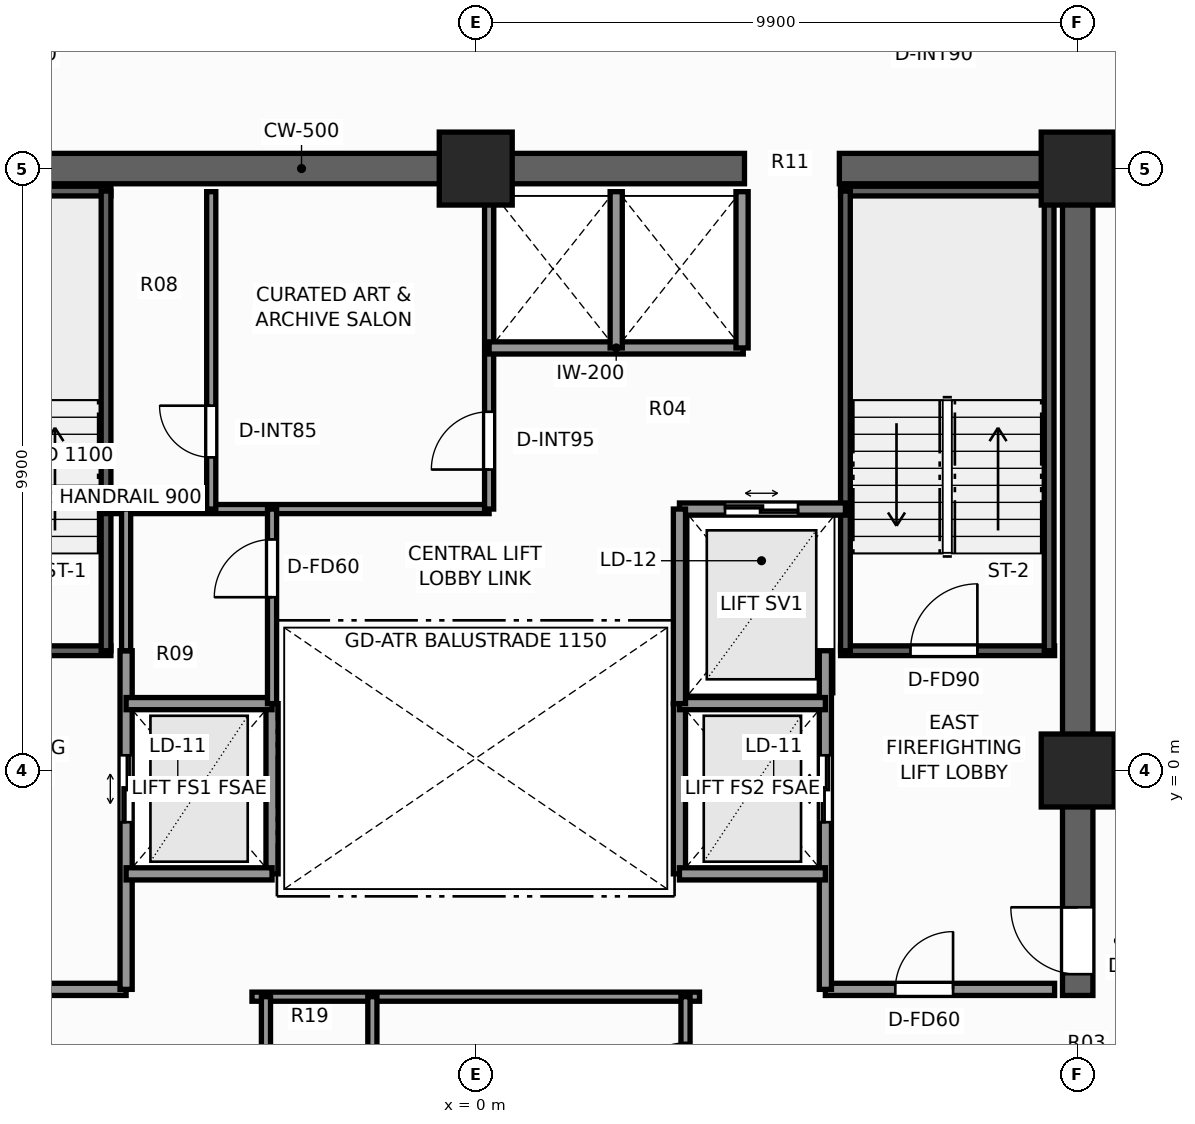
"""IFC4 building model, lengths in metres.
Left out: names, types, materials, properties, quantities, classifications, styles, units other than length and angle.
Written with IfcOpenShell. Run it as: python <this file> out.ifc"""

import sys

from ifc_helpers import new_model, si_unit, direction, frame, frame_2d, origin, origin_2d, place, context, subcontext, project, spatial, rectangle, extrude, element, fill, save


model = new_model("IFC4")
c1 = context("Model", 3, precision=1e-05, world=origin(), true_north=direction((0.0, 1.0)))
c2 = subcontext(c1, "Body", "Model", "MODEL_VIEW")
j1 = project(units=[si_unit("LENGTHUNIT", "METRE"), si_unit("PLANEANGLEUNIT", "RADIAN")], contexts=[c1])
p1 = place(None, origin())
s1 = spatial("IfcSite", under=j1, at=p1, CompositionType="ELEMENT")
p2 = place(p1, origin())
s2 = spatial("IfcBuilding", under=s1, at=p2, CompositionType="ELEMENT")
p3 = place(p2, frame((0.0, 0.0, 173.4)))
s3 = spatial("IfcBuildingStorey", under=s2, at=p3, CompositionType="ELEMENT", Elevation=173.4)
p4 = place(p3, frame((-10.15, 9.9, 0.0), z_axis=(0.0, 0.0, 1.0), x_axis=(1.0, 0.0, 0.0)))
e1 = element("IfcWall", 1, at=p4, inside=s3, PredefinedType="SHEAR", context=c2, shape_type="SweptSolid", body=[
    extrude(rectangle(XDim=14.57, YDim=0.5, at=frame_2d((7.285, 0.0))), origin(), (0.0, 0.0, 1.0), 3.3),
])
p5 = place(p3, frame((5.98, 9.9, 0.0), z_axis=(0.0, 0.0, 1.0), x_axis=(1.0, 0.0, 0.0)))
e2 = element("IfcWall", 2, at=p5, inside=s3, PredefinedType="SHEAR", context=c2, shape_type="SweptSolid", body=[
    extrude(rectangle(XDim=4.17, YDim=0.5, at=frame_2d((2.085, 0.0))), origin(), (0.0, 0.0, 1.0), 3.3),
])
p6 = place(p3, frame((9.9, -3.7, 0.0), z_axis=(0.0, 0.0, 1.0), x_axis=(0.0, 1.0, 0.0)))
e3 = element("IfcWall", 3, at=p6, inside=s3, PredefinedType="SHEAR", context=c2, shape_type="SweptSolid", body=[
    extrude(rectangle(XDim=13.35, YDim=0.5, at=frame_2d((6.675, 0.0))), origin(), (0.0, 0.0, 1.0), 3.3),
])
p7 = place(p6, frame((0.35, 0.0, 0.0)))
e4 = element("IfcOpeningElement", 4, at=p7, cuts=e3, PredefinedType="OPENING", context=c2, shape_type="SweptSolid", body=[
    extrude(rectangle(XDim=1.1, YDim=2.2, at=frame_2d((0.55, 1.1))), frame((0.0, 0.26, 0.0), z_axis=(0.0, -1.0, 0.0), x_axis=(1.0, 0.0, 0.0)), (0.0, 0.0, 1.0), 0.52),
])
for number, where, z_axis, x_axis in (
    (5, (9.9, 9.9, 0.0), (0.0, 0.0, 1.0), (1.0, 0.0, 0.0)),
    (6, (9.9, 0.0, 0.0), (0.0, 0.0, 1.0), (1.0, 0.0, 0.0)),
    (7, (0.0, 9.9, 0.0), (0.0, 0.0, 1.0), (1.0, 0.0, 0.0)),
):
    element("IfcColumn", number, at=place(p3, frame(where, z_axis=z_axis, x_axis=x_axis)), inside=s3, PredefinedType="COLUMN", context=c2, shape_type="SweptSolid", body=[
        extrude(rectangle(XDim=1.2, YDim=1.2, at=origin_2d()), origin(), (0.0, 0.0, 1.0), 3.3),
    ])
p8 = place(p3, frame((-9.52, 1.97, 0.0), z_axis=(0.0, 0.0, 1.0), x_axis=(1.0, 0.0, 0.0)))
e8 = element("IfcWall", 8, at=p8, inside=s3, PredefinedType="SHEAR", context=c2, shape_type="SweptSolid", body=[
    extrude(rectangle(XDim=3.52, YDim=0.16, at=frame_2d((1.76, 0.0))), origin(), (0.0, 0.0, 1.0), 3.3),
])
p9 = place(p8, frame((1.15, 0.0, 0.0)))
e9 = element("IfcOpeningElement", 9, at=p9, cuts=e8, PredefinedType="OPENING", context=c2, shape_type="SweptSolid", body=[
    extrude(rectangle(XDim=1.1, YDim=2.2, at=frame_2d((0.55, 1.1))), frame((0.0, 0.09, 0.0), z_axis=(0.0, -1.0, 0.0), x_axis=(1.0, 0.0, 0.0)), (0.0, 0.0, 1.0), 0.18),
])
p10 = place(p3, frame((-9.52, 9.53, 0.0), z_axis=(0.0, 0.0, 1.0), x_axis=(1.0, 0.0, 0.0)))
e10 = element("IfcWall", 10, at=p10, inside=s3, PredefinedType="SHEAR", context=c2, shape_type="SweptSolid", body=[
    extrude(rectangle(XDim=3.52, YDim=0.16, at=frame_2d((1.76, 0.0))), origin(), (0.0, 0.0, 1.0), 3.3),
])
p11 = place(p3, frame((-6.08, 1.97, 0.0), z_axis=(0.0, 0.0, 1.0), x_axis=(0.0, 1.0, 0.0)))
e11 = element("IfcWall", 11, at=p11, inside=s3, PredefinedType="SHEAR", context=c2, shape_type="SweptSolid", body=[
    extrude(rectangle(XDim=7.56, YDim=0.16, at=frame_2d((3.78, 0.0))), origin(), (0.0, 0.0, 1.0), 3.3),
])
p12 = place(p3, frame((6.0, 1.97, 0.0), z_axis=(0.0, 0.0, 1.0), x_axis=(1.0, 0.0, 0.0)))
e12 = element("IfcWall", 12, at=p12, inside=s3, PredefinedType="SHEAR", context=c2, shape_type="SweptSolid", body=[
    extrude(rectangle(XDim=3.52, YDim=0.16, at=frame_2d((1.76, 0.0))), origin(), (0.0, 0.0, 1.0), 3.3),
])
p13 = place(p12, frame((1.15, 0.0, 0.0)))
e13 = element("IfcOpeningElement", 13, at=p13, cuts=e12, PredefinedType="OPENING", context=c2, shape_type="SweptSolid", body=[
    extrude(rectangle(XDim=1.1, YDim=2.2, at=frame_2d((0.55, 1.1))), frame((0.0, 0.09, 0.0), z_axis=(0.0, -1.0, 0.0), x_axis=(1.0, 0.0, 0.0)), (0.0, 0.0, 1.0), 0.18),
])
p14 = place(p3, frame((6.0, 9.53, 0.0), z_axis=(0.0, 0.0, 1.0), x_axis=(1.0, 0.0, 0.0)))
e14 = element("IfcWall", 14, at=p14, inside=s3, PredefinedType="SHEAR", context=c2, shape_type="SweptSolid", body=[
    extrude(rectangle(XDim=3.52, YDim=0.16, at=frame_2d((1.76, 0.0))), origin(), (0.0, 0.0, 1.0), 3.3),
])
for number, where, z_axis, x_axis in (
    (15, (6.08, 1.97, 0.0), (0.0, 0.0, 1.0), (0.0, 1.0, 0.0)),
    (16, (9.43, 1.97, 0.0), (0.0, 0.0, 1.0), (0.0, 1.0, 0.0)),
):
    element("IfcWall", number, at=place(p3, frame(where, z_axis=z_axis, x_axis=x_axis)), inside=s3, PredefinedType="SHEAR", context=c2, shape_type="SweptSolid", body=[
        extrude(rectangle(XDim=7.56, YDim=0.16, at=frame_2d((3.78, 0.0))), origin(), (0.0, 0.0, 1.0), 3.3),
    ])
p15 = place(p3, frame((-9.52, -3.6, 0.0), z_axis=(0.0, 0.0, 1.0), x_axis=(1.0, 0.0, 0.0)))
e17 = element("IfcWall", 17, at=p15, inside=s3, PredefinedType="SOLIDWALL", context=c2, shape_type="SweptSolid", body=[
    extrude(rectangle(XDim=3.77, YDim=0.2, at=frame_2d((1.885, 0.0))), origin(), (0.0, 0.0, 1.0), 3.08),
])
p16 = place(p15, frame((1.15, 0.0, 0.0)))
e18 = element("IfcOpeningElement", 18, at=p16, cuts=e17, PredefinedType="OPENING", context=c2, shape_type="SweptSolid", body=[
    extrude(rectangle(XDim=0.95, YDim=2.06, at=frame_2d((0.475, 1.03))), frame((0.0, 0.11, 0.0), z_axis=(0.0, -1.0, 0.0), x_axis=(1.0, 0.0, 0.0)), (0.0, 0.0, 1.0), 0.22),
])
p17 = place(p3, frame((-5.75, -3.6, 0.0), z_axis=(0.0, 0.0, 1.0), x_axis=(0.0, 1.0, 0.0)))
e19 = element("IfcWall", 19, at=p17, inside=s3, PredefinedType="SOLIDWALL", context=c2, shape_type="SweptSolid", body=[
    extrude(rectangle(XDim=5.57, YDim=0.2, at=frame_2d((2.785, 0.0))), origin(), (0.0, 0.0, 1.0), 2.715),
])
p18 = place(p17, frame((2.75, 0.0, 0.0)))
e20 = element("IfcOpeningElement", 20, at=p18, cuts=e19, PredefinedType="OPENING", context=c2, shape_type="SweptSolid", body=[
    extrude(rectangle(XDim=1.1, YDim=2.2, at=frame_2d((0.55, 1.1))), frame((0.0, 0.11, 0.0), z_axis=(0.0, -1.0, 0.0), x_axis=(1.0, 0.0, 0.0)), (0.0, 0.0, 1.0), 0.22),
])
p19 = place(p3, frame((-3.35, -1.7, 0.0), z_axis=(0.0, 0.0, 1.0), x_axis=(0.0, 1.0, 0.0)))
e21 = element("IfcWall", 21, at=p19, inside=s3, PredefinedType="SOLIDWALL", context=c2, shape_type="SweptSolid", body=[
    extrude(rectangle(XDim=2.8, YDim=0.2, at=frame_2d((1.4, 0.0))), origin(), (0.0, 0.0, 1.0), 2.715),
])
for number, where, z_axis, x_axis in (
    (22, (-5.75, -1.7, 0.0), (0.0, 0.0, 1.0), (1.0, 0.0, 0.0)),
    (23, (-5.75, 1.1, 0.0), (0.0, 0.0, 1.0), (1.0, 0.0, 0.0)),
):
    element("IfcWall", number, at=place(p3, frame(where, z_axis=z_axis, x_axis=x_axis)), inside=s3, PredefinedType="SOLIDWALL", context=c2, shape_type="SweptSolid", body=[
        extrude(rectangle(XDim=2.4, YDim=0.2, at=frame_2d((1.2, 0.0))), origin(), (0.0, 0.0, 1.0), 3.08),
    ])
p20 = place(p3, frame((5.75, -3.6, 0.0), z_axis=(0.0, 0.0, 1.0), x_axis=(1.0, 0.0, 0.0)))
e24 = element("IfcWall", 24, at=p20, inside=s3, PredefinedType="SOLIDWALL", context=c2, shape_type="SweptSolid", body=[
    extrude(rectangle(XDim=3.77, YDim=0.2, at=frame_2d((1.885, 0.0))), origin(), (0.0, 0.0, 1.0), 3.08),
])
p21 = place(p20, frame((1.15, 0.0, 0.0)))
e25 = element("IfcOpeningElement", 25, at=p21, cuts=e24, PredefinedType="OPENING", context=c2, shape_type="SweptSolid", body=[
    extrude(rectangle(XDim=0.95, YDim=2.06, at=frame_2d((0.475, 1.03))), frame((0.0, 0.11, 0.0), z_axis=(0.0, -1.0, 0.0), x_axis=(1.0, 0.0, 0.0)), (0.0, 0.0, 1.0), 0.22),
])
p22 = place(p3, frame((5.75, -3.6, 0.0), z_axis=(0.0, 0.0, 1.0), x_axis=(0.0, 1.0, 0.0)))
e26 = element("IfcWall", 26, at=p22, inside=s3, PredefinedType="SOLIDWALL", context=c2, shape_type="SweptSolid", body=[
    extrude(rectangle(XDim=5.57, YDim=0.2, at=frame_2d((2.785, 0.0))), origin(), (0.0, 0.0, 1.0), 2.715),
])
p23 = place(p22, frame((2.75, 0.0, 0.0)))
e27 = element("IfcOpeningElement", 27, at=p23, cuts=e26, PredefinedType="OPENING", context=c2, shape_type="SweptSolid", body=[
    extrude(rectangle(XDim=1.1, YDim=2.2, at=frame_2d((0.55, 1.1))), frame((0.0, 0.11, 0.0), z_axis=(0.0, -1.0, 0.0), x_axis=(1.0, 0.0, 0.0)), (0.0, 0.0, 1.0), 0.22),
])
p24 = place(p3, frame((3.35, -1.7, 0.0), z_axis=(0.0, 0.0, 1.0), x_axis=(0.0, 1.0, 0.0)))
e28 = element("IfcWall", 28, at=p24, inside=s3, PredefinedType="SOLIDWALL", context=c2, shape_type="SweptSolid", body=[
    extrude(rectangle(XDim=2.8, YDim=0.2, at=frame_2d((1.4, 0.0))), origin(), (0.0, 0.0, 1.0), 2.715),
])
for number, where, z_axis, x_axis in (
    (29, (3.35, -1.7, 0.0), (0.0, 0.0, 1.0), (1.0, 0.0, 0.0)),
    (30, (3.35, 1.1, 0.0), (0.0, 0.0, 1.0), (1.0, 0.0, 0.0)),
):
    element("IfcWall", number, at=place(p3, frame(where, z_axis=z_axis, x_axis=x_axis)), inside=s3, PredefinedType="SOLIDWALL", context=c2, shape_type="SweptSolid", body=[
        extrude(rectangle(XDim=2.4, YDim=0.2, at=frame_2d((1.2, 0.0))), origin(), (0.0, 0.0, 1.0), 3.08),
    ])
p25 = place(p3, frame((3.35, 4.3, 0.0), z_axis=(0.0, 0.0, 1.0), x_axis=(1.0, 0.0, 0.0)))
e31 = element("IfcWall", 31, at=p25, inside=s3, PredefinedType="SOLIDWALL", context=c2, shape_type="SweptSolid", body=[
    extrude(rectangle(XDim=2.73, YDim=0.2, at=frame_2d((1.365, 0.0))), origin(), (0.0, 0.0, 1.0), 3.08),
])
p26 = place(p25, frame((0.75, 0.0, 0.0)))
e32 = element("IfcOpeningElement", 32, at=p26, cuts=e31, PredefinedType="OPENING", context=c2, shape_type="SweptSolid", body=[
    extrude(rectangle(XDim=1.2, YDim=2.25, at=frame_2d((0.6, 1.125))), frame((0.0, 0.11, 0.0), z_axis=(0.0, -1.0, 0.0), x_axis=(1.0, 0.0, 0.0)), (0.0, 0.0, 1.0), 0.22),
])
p27 = place(p3, frame((3.35, 1.1, 0.0), z_axis=(0.0, 0.0, 1.0), x_axis=(0.0, 1.0, 0.0)))
e33 = element("IfcWall", 33, at=p27, inside=s3, PredefinedType="SOLIDWALL", context=c2, shape_type="SweptSolid", body=[
    extrude(rectangle(XDim=3.2, YDim=0.2, at=frame_2d((1.6, 0.0))), origin(), (0.0, 0.0, 1.0), 2.715),
])
p28 = place(p3, frame((-6.08, 4.3, 0.0), z_axis=(0.0, 0.0, 1.0), x_axis=(1.0, 0.0, 0.0)))
e34 = element("IfcWall", 34, at=p28, inside=s3, PredefinedType="PARTITIONING", context=c2, shape_type="SweptSolid", body=[
    extrude(rectangle(XDim=6.3, YDim=0.15, at=frame_2d((3.15, 0.0))), origin(), (0.0, 0.0, 1.0), 3.08),
])
p29 = place(p3, frame((0.22, 4.3, 0.0), z_axis=(0.0, 0.0, 1.0), x_axis=(0.0, 1.0, 0.0)))
e35 = element("IfcWall", 35, at=p29, inside=s3, PredefinedType="PARTITIONING", context=c2, shape_type="SweptSolid", body=[
    extrude(rectangle(XDim=5.22, YDim=0.15, at=frame_2d((2.61, 0.0))), origin(), (0.0, 0.0, 1.0), 3.08),
])
p30 = place(p29, frame((0.65, 0.0, 0.0)))
e36 = element("IfcOpeningElement", 36, at=p30, cuts=e35, PredefinedType="OPENING", context=c2, shape_type="SweptSolid", body=[
    extrude(rectangle(XDim=0.95, YDim=2.06, at=frame_2d((0.475, 1.03))), frame((0.0, 0.085, 0.0), z_axis=(0.0, -1.0, 0.0), x_axis=(1.0, 0.0, 0.0)), (0.0, 0.0, 1.0), 0.17),
])
p31 = place(p3, frame((-4.35, 4.3, 0.0), z_axis=(0.0, 0.0, 1.0), x_axis=(0.0, 1.0, 0.0)))
e37 = element("IfcWall", 37, at=p31, inside=s3, PredefinedType="PARTITIONING", context=c2, shape_type="SweptSolid", body=[
    extrude(rectangle(XDim=5.22, YDim=0.15, at=frame_2d((2.61, 0.0))), origin(), (0.0, 0.0, 1.0), 3.08),
])
p32 = place(p31, frame((0.85, 0.0, 0.0)))
e38 = element("IfcOpeningElement", 38, at=p32, cuts=e37, PredefinedType="OPENING", context=c2, shape_type="SweptSolid", body=[
    extrude(rectangle(XDim=0.85, YDim=2.03, at=frame_2d((0.425, 1.015))), frame((0.0, 0.085, 0.0), z_axis=(0.0, -1.0, 0.0), x_axis=(1.0, 0.0, 0.0)), (0.0, 0.0, 1.0), 0.17),
])
p33 = place(p3, frame((0.22, 6.95, 0.0), z_axis=(0.0, 0.0, 1.0), x_axis=(1.0, 0.0, 0.0)))
e39 = element("IfcWall", 39, at=p33, inside=s3, PredefinedType="SOLIDWALL", context=c2, shape_type="SweptSolid", body=[
    extrude(rectangle(XDim=4.18, YDim=0.2, at=frame_2d((2.09, 0.0))), origin(), (0.0, 0.0, 1.0), 3.08),
])
for number, where, z_axis, x_axis in (
    (40, (4.38, 6.95, 0.0), (0.0, 0.0, 1.0), (0.0, 1.0, 0.0)),
    (41, (2.31, 6.95, 0.0), (0.0, 0.0, 1.0), (0.0, 1.0, 0.0)),
):
    element("IfcWall", number, at=place(p3, frame(where, z_axis=z_axis, x_axis=x_axis)), inside=s3, PredefinedType="SOLIDWALL", context=c2, shape_type="SweptSolid", body=[
        extrude(rectangle(XDim=2.57, YDim=0.2, at=frame_2d((1.285, 0.0))), origin(), (0.0, 0.0, 1.0), 3.08),
    ])
p34 = place(p3, frame((-3.68, -3.72, 0.0), z_axis=(0.0, 0.0, 1.0), x_axis=(1.0, 0.0, 0.0)))
e42 = element("IfcWall", 42, at=p34, inside=s3, PredefinedType="PARTITIONING", context=c2, shape_type="SweptSolid", body=[
    extrude(rectangle(XDim=7.36, YDim=0.15, at=frame_2d((3.68, 0.0))), origin(), (0.0, 0.0, 1.0), 3.08),
])
p35 = place(p3, frame((3.45, -6.08, 0.0), z_axis=(0.0, 0.0, 1.0), x_axis=(0.0, 1.0, 0.0)))
e43 = element("IfcWall", 43, at=p35, inside=s3, PredefinedType="PARTITIONING", context=c2, shape_type="SweptSolid", body=[
    extrude(rectangle(XDim=2.36, YDim=0.15, at=frame_2d((1.18, 0.0))), origin(), (0.0, 0.0, 1.0), 3.08),
])
p36 = place(p35, frame((0.65, 0.0, 0.0)))
e44 = element("IfcOpeningElement", 44, at=p36, cuts=e43, PredefinedType="OPENING", context=c2, shape_type="SweptSolid", body=[
    extrude(rectangle(XDim=0.95, YDim=2.06, at=frame_2d((0.475, 1.03))), frame((0.0, 0.085, 0.0), z_axis=(0.0, -1.0, 0.0), x_axis=(1.0, 0.0, 0.0)), (0.0, 0.0, 1.0), 0.17),
])
p37 = place(p3, frame((-3.45, -6.08, 0.0), z_axis=(0.0, 0.0, 1.0), x_axis=(0.0, 1.0, 0.0)))
e45 = element("IfcWall", 45, at=p37, inside=s3, PredefinedType="PARTITIONING", context=c2, shape_type="SweptSolid", body=[
    extrude(rectangle(XDim=2.36, YDim=0.15, at=frame_2d((1.18, 0.0))), origin(), (0.0, 0.0, 1.0), 3.08),
])
p38 = place(p3, frame((-1.7, -6.08, 0.0), z_axis=(0.0, 0.0, 1.0), x_axis=(0.0, 1.0, 0.0)))
e46 = element("IfcWall", 46, at=p38, inside=s3, PredefinedType="PARTITIONING", context=c2, shape_type="SweptSolid", body=[
    extrude(rectangle(XDim=2.36, YDim=0.15, at=frame_2d((1.18, 0.0))), origin(), (0.0, 0.0, 1.0), 3.08),
])
p39 = place(p38, frame((0.65, 0.0, 0.0)))
e47 = element("IfcOpeningElement", 47, at=p39, cuts=e46, PredefinedType="OPENING", context=c2, shape_type="SweptSolid", body=[
    extrude(rectangle(XDim=0.9, YDim=2.06, at=frame_2d((0.45, 1.03))), frame((0.0, 0.085, 0.0), z_axis=(0.0, -1.0, 0.0), x_axis=(1.0, 0.0, 0.0)), (0.0, 0.0, 1.0), 0.17),
])
p40 = place(p3, frame((-3.35, 1.1, 0.0), z_axis=(0.0, 0.0, 1.0), x_axis=(0.0, 1.0, 0.0)))
e48 = element("IfcWall", 48, at=p40, inside=s3, PredefinedType="PARTITIONING", context=c2, shape_type="SweptSolid", body=[
    extrude(rectangle(XDim=3.2, YDim=0.15, at=frame_2d((1.6, 0.0))), origin(), (0.0, 0.0, 1.0), 2.715),
])
p41 = place(p40, frame((1.75, 0.0, 0.0)))
e49 = element("IfcOpeningElement", 49, at=p41, cuts=e48, PredefinedType="OPENING", context=c2, shape_type="SweptSolid", body=[
    extrude(rectangle(XDim=0.95, YDim=2.06, at=frame_2d((0.475, 1.03))), frame((0.0, 0.085, 0.0), z_axis=(0.0, -1.0, 0.0), x_axis=(1.0, 0.0, 0.0)), (0.0, 0.0, 1.0), 0.17),
])
p42 = place(p3, frame((-5.75, 1.97, 0.0), z_axis=(0.0, 0.0, 1.0), x_axis=(0.0, 1.0, 0.0)))
e50 = element("IfcWall", 50, at=p42, inside=s3, PredefinedType="PARTITIONING", context=c2, shape_type="SweptSolid", body=[
    extrude(rectangle(XDim=2.33, YDim=0.15, at=frame_2d((1.165, 0.0))), origin(), (0.0, 0.0, 1.0), 2.715),
])
p43 = place(p13, origin())
e51 = element("IfcDoor", 51, at=p43, inside=s3, OperationType="SINGLE_SWING_RIGHT", PredefinedType="DOOR", context=c2, shape_type="SweptSolid", body=[
    extrude(rectangle(XDim=1.1, YDim=2.2, at=frame_2d((0.55, 1.1))), frame((0.0, 0.025, 0.0), z_axis=(0.0, -1.0, 0.0), x_axis=(1.0, 0.0, 0.0)), (0.0, 0.0, 1.0), 0.05),
])
fill(e13, e51)
p44 = place(p18, origin())
e52 = element("IfcDoor", 52, at=p44, inside=s3, OperationType="DOUBLE_DOOR_SLIDING", PredefinedType="DOOR", context=c2, shape_type="SweptSolid", body=[
    extrude(rectangle(XDim=1.1, YDim=2.2, at=frame_2d((0.55, 1.1))), frame((0.0, 0.025, 0.0), z_axis=(0.0, -1.0, 0.0), x_axis=(1.0, 0.0, 0.0)), (0.0, 0.0, 1.0), 0.05),
])
fill(e20, e52)
p45 = place(p7, origin())
e53 = element("IfcDoor", 53, at=p45, inside=s3, OperationType="SINGLE_SWING_RIGHT", PredefinedType="DOOR", context=c2, shape_type="SweptSolid", body=[
    extrude(rectangle(XDim=1.1, YDim=2.2, at=frame_2d((0.55, 1.1))), frame((0.0, 0.025, 0.0), z_axis=(0.0, -1.0, 0.0), x_axis=(1.0, 0.0, 0.0)), (0.0, 0.0, 1.0), 0.05),
])
fill(e4, e53)
p46 = place(p23, origin())
e54 = element("IfcDoor", 54, at=p46, inside=s3, OperationType="DOUBLE_DOOR_SLIDING", PredefinedType="DOOR", context=c2, shape_type="SweptSolid", body=[
    extrude(rectangle(XDim=1.1, YDim=2.2, at=frame_2d((0.55, 1.1))), frame((0.0, 0.025, 0.0), z_axis=(0.0, -1.0, 0.0), x_axis=(1.0, 0.0, 0.0)), (0.0, 0.0, 1.0), 0.05),
])
fill(e27, e54)
p47 = place(p26, origin())
e55 = element("IfcDoor", 55, at=p47, inside=s3, OperationType="DOUBLE_DOOR_SLIDING", PredefinedType="DOOR", context=c2, shape_type="SweptSolid", body=[
    extrude(rectangle(XDim=1.2, YDim=2.25, at=frame_2d((0.6, 1.125))), frame((0.0, 0.025, 0.0), z_axis=(0.0, -1.0, 0.0), x_axis=(1.0, 0.0, 0.0)), (0.0, 0.0, 1.0), 0.05),
])
fill(e32, e55)
p48 = place(p30, origin())
e56 = element("IfcDoor", 56, at=p48, inside=s3, OperationType="SINGLE_SWING_LEFT", PredefinedType="DOOR", context=c2, shape_type="SweptSolid", body=[
    extrude(rectangle(XDim=0.95, YDim=2.06, at=frame_2d((0.475, 1.03))), frame((0.0, 0.025, 0.0), z_axis=(0.0, -1.0, 0.0), x_axis=(1.0, 0.0, 0.0)), (0.0, 0.0, 1.0), 0.05),
])
fill(e36, e56)
p49 = place(p32, origin())
e57 = element("IfcDoor", 57, at=p49, inside=s3, OperationType="SINGLE_SWING_RIGHT", PredefinedType="DOOR", context=c2, shape_type="SweptSolid", body=[
    extrude(rectangle(XDim=0.85, YDim=2.03, at=frame_2d((0.425, 1.015))), frame((0.0, 0.025, 0.0), z_axis=(0.0, -1.0, 0.0), x_axis=(1.0, 0.0, 0.0)), (0.0, 0.0, 1.0), 0.05),
])
fill(e38, e57)
p50 = place(p21, origin())
e58 = element("IfcDoor", 58, at=p50, inside=s3, OperationType="SINGLE_SWING_RIGHT", PredefinedType="DOOR", context=c2, shape_type="SweptSolid", body=[
    extrude(rectangle(XDim=0.95, YDim=2.06, at=frame_2d((0.475, 1.03))), frame((0.0, 0.025, 0.0), z_axis=(0.0, -1.0, 0.0), x_axis=(1.0, 0.0, 0.0)), (0.0, 0.0, 1.0), 0.05),
])
fill(e25, e58)
p51 = place(p36, origin())
e59 = element("IfcDoor", 59, at=p51, inside=s3, OperationType="SINGLE_SWING_LEFT", PredefinedType="DOOR", context=c2, shape_type="SweptSolid", body=[
    extrude(rectangle(XDim=0.95, YDim=2.06, at=frame_2d((0.475, 1.03))), frame((0.0, 0.025, 0.0), z_axis=(0.0, -1.0, 0.0), x_axis=(1.0, 0.0, 0.0)), (0.0, 0.0, 1.0), 0.05),
])
fill(e44, e59)
p52 = place(p41, origin())
e60 = element("IfcDoor", 60, at=p52, inside=s3, OperationType="SINGLE_SWING_LEFT", PredefinedType="DOOR", context=c2, shape_type="SweptSolid", body=[
    extrude(rectangle(XDim=0.95, YDim=2.06, at=frame_2d((0.475, 1.03))), frame((0.0, 0.025, 0.0), z_axis=(0.0, -1.0, 0.0), x_axis=(1.0, 0.0, 0.0)), (0.0, 0.0, 1.0), 0.05),
])
fill(e49, e60)
save(model, sys.argv[1])
